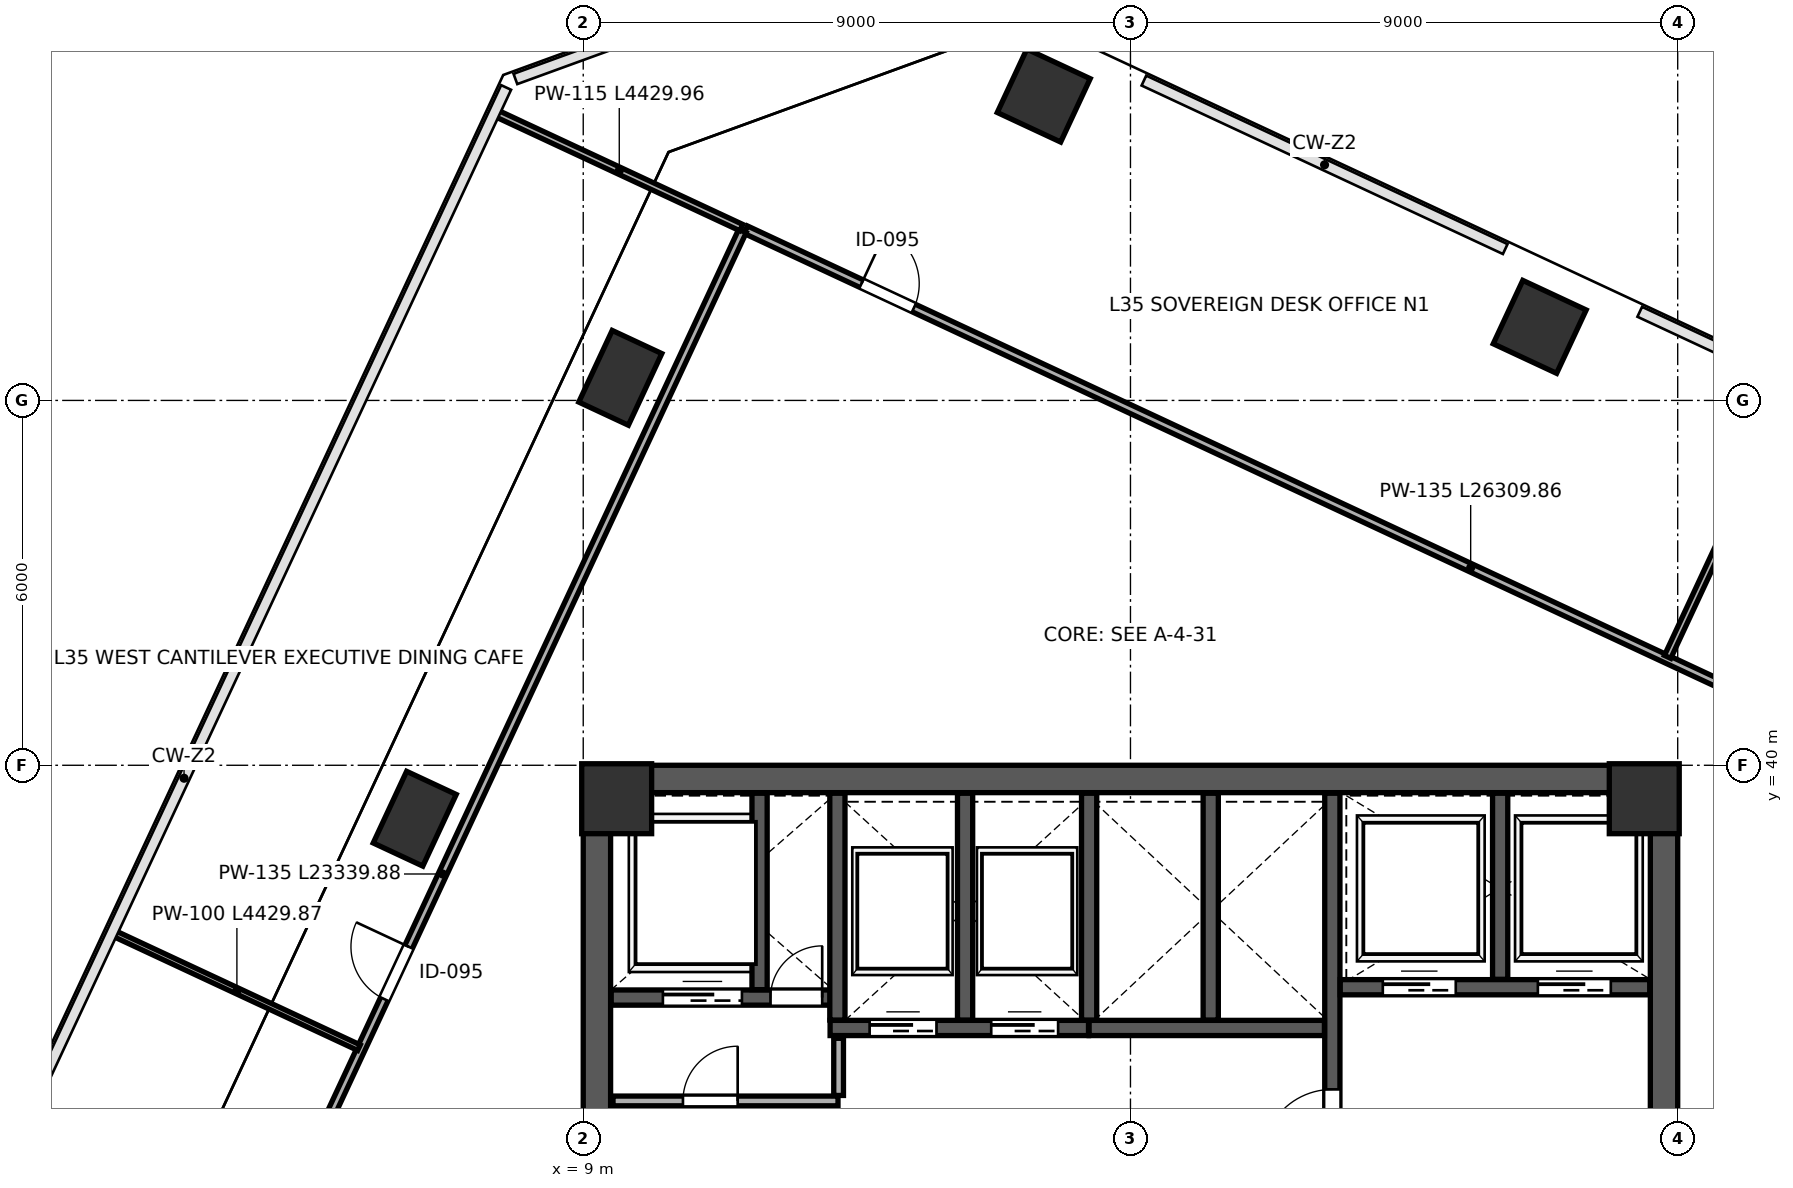
"""IFC4 building model, lengths in metres.
Left out: names, types, materials, properties, quantities, classifications, styles, units other than length and angle.
Written with IfcOpenShell. Run it as: python <this file> out.ifc"""

import sys

from ifc_helpers import new_model, si_unit, direction, frame, frame_2d, origin, origin_2d, place, context, subcontext, project, spatial, rectangle, extrude, clip, halfspace, source, transform, mapped, element, fill, save


model = new_model("IFC4")
c1 = context("Model", 3, precision=1e-05, world=origin(), true_north=direction((0.0, 1.0)))
c2 = subcontext(c1, "Body", "Model", "MODEL_VIEW")
j1 = project(units=[si_unit("LENGTHUNIT", "METRE"), si_unit("PLANEANGLEUNIT", "RADIAN")], contexts=[c1])
p1 = place(None, origin())
s1 = spatial("IfcSite", under=j1, at=p1, CompositionType="ELEMENT")
p2 = place(p1, origin())
s2 = spatial("IfcBuilding", under=s1, at=p2, CompositionType="ELEMENT")
p3 = place(p2, frame((0.0, 0.0, 158.2)))
s3 = spatial("IfcBuildingStorey", under=s2, at=p3, CompositionType="ELEMENT", Elevation=158.2)
m1 = source(origin(), c2, "Body", "SweptSolid", [
    extrude(rectangle(XDim=1.15, YDim=1.15, at=origin_2d()), origin(), (0.0, 0.0, 1.0), 4.198),
])
for number, where, z_axis, x_axis in (
    (1, (9.55, 39.45, 0.001), (0.0, 0.0, 1.0), (1.0, 0.0, 0.0)),
    (2, (26.45, 39.45, 0.001), (0.0, 0.0, 1.0), (1.0, 0.0, 0.0)),
):
    element("IfcColumn", number, at=place(p3, frame(where, z_axis=z_axis, x_axis=x_axis)), inside=s3, PredefinedType="COLUMN", context=c2, shape_type="MappedRepresentation", body=[
        mapped(m1, transform((0.0, 0.0, 0.0), scale=1.0)),
    ])
p4 = place(p3, frame((16.574, 51.013, 0.0), z_axis=(0.098540759891, 0.024403873635, 0.994833739673), x_axis=(-0.190238417306, -0.980800009902, 0.04290320684)))
e3 = element("IfcColumn", 3, at=p4, inside=s3, PredefinedType="COLUMN", context=c2, shape_type="Clipping", body=[
    clip(clip(extrude(rectangle(XDim=1.15, YDim=1.15, at=origin_2d()), origin(), (0.0, 0.0, 1.0), 4.222), halfspace(frame((0.0, 0.0, 0.079), z_axis=(0.0, 0.0, -1.0), x_axis=(1.0, 0.0, 0.0)), False)), halfspace(frame((0.0, 0.0, 4.143), z_axis=(0.0, 0.0, 1.0), x_axis=(1.0, 0.0, 0.0)), False)),
])
p5 = place(p3, frame((24.731, 47.21, 0.0), z_axis=(0.078509951606, -0.017614040803, 0.996757710312), x_axis=(-0.609432467113, -0.792108426647, 0.034004535909)))
e4 = element("IfcColumn", 4, at=p5, inside=s3, PredefinedType="COLUMN", context=c2, shape_type="Clipping", body=[
    clip(clip(extrude(rectangle(XDim=1.15, YDim=1.15, at=origin_2d()), origin(), (0.0, 0.0, 1.0), 4.214), halfspace(frame((0.0, 0.0, 0.062), z_axis=(0.0, 0.0, -1.0), x_axis=(1.0, 0.0, 0.0)), False)), halfspace(frame((0.0, 0.0, 4.151), z_axis=(0.0, 0.0, 1.0), x_axis=(1.0, 0.0, 0.0)), False)),
])
p6 = place(p3, frame((6.229, 39.121, 0.0), z_axis=(0.037698062692, 0.078638969486, 0.996190126706), x_axis=(0.635262052189, -0.771416737954, 0.036855684135)))
e5 = element("IfcColumn", 5, at=p6, inside=s3, PredefinedType="PILASTER", context=c2, shape_type="Clipping", body=[
    clip(clip(extrude(rectangle(XDim=0.9, YDim=1.3, at=origin_2d()), origin(), (0.0, 0.0, 1.0), 4.216), halfspace(frame((0.0, 0.0, 0.069), z_axis=(0.0, 0.0, -1.0), x_axis=(1.0, 0.0, 0.0)), False)), halfspace(frame((0.0, 0.0, 4.147), z_axis=(0.0, 0.0, 1.0), x_axis=(1.0, 0.0, 0.0)), False)),
])
p7 = place(p3, frame((9.61, 46.372, 0.0), z_axis=(0.074984591615, 0.060635688281, 0.995339451809), x_axis=(0.242783747421, -0.969223981277, 0.040754461182)))
e6 = element("IfcColumn", 6, at=p7, inside=s3, PredefinedType="PILASTER", context=c2, shape_type="Clipping", body=[
    clip(clip(extrude(rectangle(XDim=0.9, YDim=1.3, at=origin_2d()), origin(), (0.0, 0.0, 1.0), 4.22), halfspace(frame((0.0, 0.0, 0.076), z_axis=(0.0, 0.0, -1.0), x_axis=(1.0, 0.0, 0.0)), False)), halfspace(frame((0.0, 0.0, 4.144), z_axis=(0.0, 0.0, 1.0), x_axis=(1.0, 0.0, 0.0)), False)),
])
p8 = place(p3, frame((9.225, 24.45, 0.0), z_axis=(0.0, 0.0, 1.0), x_axis=(0.0, 1.0, 0.0)))
e7 = element("IfcWall", 7, at=p8, inside=s3, PredefinedType="SHEAR", context=c2, shape_type="SweptSolid", body=[
    extrude(rectangle(XDim=15.1, YDim=0.45, at=frame_2d((7.55, 0.0))), origin(), (0.0, 0.0, 1.0), 3.96),
])
p9 = place(p3, frame((26.775, 24.45, 0.0), z_axis=(0.0, 0.0, 1.0), x_axis=(0.0, 1.0, 0.0)))
e8 = element("IfcWall", 8, at=p9, inside=s3, PredefinedType="SHEAR", context=c2, shape_type="SweptSolid", body=[
    extrude(rectangle(XDim=15.1, YDim=0.45, at=frame_2d((7.55, 0.0))), origin(), (0.0, 0.0, 1.0), 3.96),
])
p10 = place(p9, frame((8.6, 0.0, 0.0)))
e9 = element("IfcOpeningElement", 9, at=p10, cuts=e8, PredefinedType="OPENING", context=c2, shape_type="SweptSolid", body=[
    extrude(rectangle(XDim=1.15, YDim=2.2, at=frame_2d((0.575, 1.1))), frame((0.0, 0.235, 0.0), z_axis=(0.0, -1.0, 0.0), x_axis=(1.0, 0.0, 0.0)), (0.0, 0.0, 1.0), 0.47),
])
p11 = place(p3, frame((9.0, 39.775, 0.0), z_axis=(0.0, 0.0, 1.0), x_axis=(1.0, 0.0, 0.0)))
e10 = element("IfcWall", 10, at=p11, inside=s3, PredefinedType="SHEAR", context=c2, shape_type="SweptSolid", body=[
    extrude(rectangle(XDim=18.0, YDim=0.45, at=frame_2d((9.0, 0.0))), origin(), (0.0, 0.0, 1.0), 3.96),
])
p12 = place(p3, frame((21.32, 32.12, 0.0), z_axis=(0.0, 0.0, 1.0), x_axis=(0.0, 1.0, 0.0)))
e11 = element("IfcWall", 11, at=p12, inside=s3, PredefinedType="SHEAR", context=c2, shape_type="SweptSolid", body=[
    extrude(rectangle(XDim=7.42, YDim=0.25, at=frame_2d((3.71, 0.0))), origin(), (0.0, 0.0, 1.0), 3.96),
])
p13 = place(p12, frame((1.4, 0.0, 0.0)))
e12 = element("IfcOpeningElement", 12, at=p13, cuts=e11, PredefinedType="OPENING", context=c2, shape_type="SweptSolid", body=[
    extrude(rectangle(XDim=1.15, YDim=2.2, at=frame_2d((0.575, 1.1))), frame((0.0, 0.135, 0.0), z_axis=(0.0, -1.0, 0.0), x_axis=(1.0, 0.0, 0.0)), (0.0, 0.0, 1.0), 0.27),
])
p14 = place(p3, frame((9.46, 36.18, 0.0), z_axis=(0.0, 0.0, 1.0), x_axis=(1.0, 0.0, 0.0)))
e13 = element("IfcWall", 13, at=p14, inside=s3, PredefinedType="SHEAR", context=c2, shape_type="SweptSolid", body=[
    extrude(rectangle(XDim=3.79, YDim=0.25, at=frame_2d((1.895, 0.0))), origin(), (0.0, 0.0, 1.0), 3.96),
])
p15 = place(p14, frame((2.62, 0.0, 0.0)))
e14 = element("IfcOpeningElement", 14, at=p15, cuts=e13, PredefinedType="OPENING", context=c2, shape_type="SweptSolid", body=[
    extrude(rectangle(XDim=0.85, YDim=2.1, at=frame_2d((0.425, 1.05))), frame((0.0, 0.135, 0.0), z_axis=(0.0, -1.0, 0.0), x_axis=(1.0, 0.0, 0.0)), (0.0, 0.0, 1.0), 0.27),
])
p16 = place(p14, frame((0.85, 0.0, 0.0)))
e15 = element("IfcOpeningElement", 15, at=p16, cuts=e13, PredefinedType="OPENING", context=c2, shape_type="SweptSolid", body=[
    extrude(rectangle(XDim=1.3, YDim=2.25, at=frame_2d((0.65, 1.125))), frame((0.0, 0.135, 0.0), z_axis=(0.0, -1.0, 0.0), x_axis=(1.0, 0.0, 0.0)), (0.0, 0.0, 1.0), 0.27),
])
p17 = place(p3, frame((11.9, 36.31, 0.0), z_axis=(0.0, 0.0, 1.0), x_axis=(0.0, 1.0, 0.0)))
e16 = element("IfcWall", 16, at=p17, inside=s3, PredefinedType="SHEAR", context=c2, shape_type="SweptSolid", body=[
    extrude(rectangle(XDim=3.23, YDim=0.25, at=frame_2d((1.615, 0.0))), origin(), (0.0, 0.0, 1.0), 3.96),
])
p18 = place(p3, frame((21.45, 36.35, 0.0), z_axis=(0.0, 0.0, 1.0), x_axis=(1.0, 0.0, 0.0)))
e17 = element("IfcWall", 17, at=p18, inside=s3, PredefinedType="SHEAR", context=c2, shape_type="SweptSolid", body=[
    extrude(rectangle(XDim=5.09, YDim=0.25, at=frame_2d((2.545, 0.0))), origin(), (0.0, 0.0, 1.0), 3.96),
])
p19 = place(p18, frame((0.7, 0.0, 0.0)))
e18 = element("IfcOpeningElement", 18, at=p19, cuts=e17, PredefinedType="OPENING", context=c2, shape_type="SweptSolid", body=[
    extrude(rectangle(XDim=1.2, YDim=2.2, at=frame_2d((0.6, 1.1))), frame((0.0, 0.135, 0.0), z_axis=(0.0, -1.0, 0.0), x_axis=(1.0, 0.0, 0.0)), (0.0, 0.0, 1.0), 0.27),
])
p20 = place(p18, frame((3.25, 0.0, 0.0)))
e19 = element("IfcOpeningElement", 19, at=p20, cuts=e17, PredefinedType="OPENING", context=c2, shape_type="SweptSolid", body=[
    extrude(rectangle(XDim=1.2, YDim=2.2, at=frame_2d((0.6, 1.1))), frame((0.0, 0.135, 0.0), z_axis=(0.0, -1.0, 0.0), x_axis=(1.0, 0.0, 0.0)), (0.0, 0.0, 1.0), 0.27),
])
p21 = place(p3, frame((24.08, 36.48, 0.0), z_axis=(0.0, 0.0, 1.0), x_axis=(0.0, 1.0, 0.0)))
e20 = element("IfcWall", 20, at=p21, inside=s3, PredefinedType="SHEAR", context=c2, shape_type="SweptSolid", body=[
    extrude(rectangle(XDim=3.06, YDim=0.25, at=frame_2d((1.53, 0.0))), origin(), (0.0, 0.0, 1.0), 3.96),
])
p22 = place(p3, frame((13.06, 35.68, 0.0), z_axis=(0.0, 0.0, 1.0), x_axis=(1.0, 0.0, 0.0)))
e21 = element("IfcWall", 21, at=p22, inside=s3, PredefinedType="SHEAR", context=c2, shape_type="SweptSolid", body=[
    extrude(rectangle(XDim=4.25, YDim=0.25, at=frame_2d((2.125, 0.0))), origin(), (0.0, 0.0, 1.0), 3.96),
])
p23 = place(p22, frame((0.65, 0.0, 0.0)))
e22 = element("IfcOpeningElement", 22, at=p23, cuts=e21, PredefinedType="OPENING", context=c2, shape_type="SweptSolid", body=[
    extrude(rectangle(XDim=1.1, YDim=2.2, at=frame_2d((0.55, 1.1))), frame((0.0, 0.135, 0.0), z_axis=(0.0, -1.0, 0.0), x_axis=(1.0, 0.0, 0.0)), (0.0, 0.0, 1.0), 0.27),
])
p24 = place(p22, frame((2.65, 0.0, 0.0)))
e23 = element("IfcOpeningElement", 23, at=p24, cuts=e21, PredefinedType="OPENING", context=c2, shape_type="SweptSolid", body=[
    extrude(rectangle(XDim=1.1, YDim=2.2, at=frame_2d((0.55, 1.1))), frame((0.0, 0.135, 0.0), z_axis=(0.0, -1.0, 0.0), x_axis=(1.0, 0.0, 0.0)), (0.0, 0.0, 1.0), 0.27),
])
for number, where, z_axis, x_axis in (
    (24, (13.18, 35.81, 0.0), (0.0, 0.0, 1.0), (0.0, 1.0, 0.0)),
    (25, (15.28, 35.81, 0.0), (0.0, 0.0, 1.0), (0.0, 1.0, 0.0)),
):
    element("IfcWall", number, at=place(p3, frame(where, z_axis=z_axis, x_axis=x_axis)), inside=s3, PredefinedType="SHEAR", context=c2, shape_type="SweptSolid", body=[
        extrude(rectangle(XDim=3.73, YDim=0.25, at=frame_2d((1.865, 0.0))), origin(), (0.0, 0.0, 1.0), 3.96),
    ])
p25 = place(p3, frame((17.32, 35.68, 0.0), z_axis=(0.0, 0.0, 1.0), x_axis=(1.0, 0.0, 0.0)))
e26 = element("IfcWall", 26, at=p25, inside=s3, PredefinedType="SHEAR", context=c2, shape_type="SweptSolid", body=[
    extrude(rectangle(XDim=3.87, YDim=0.25, at=frame_2d((1.935, 0.0))), origin(), (0.0, 0.0, 1.0), 3.96),
])
for number, where, z_axis, x_axis in (
    (27, (17.32, 35.81, 0.0), (0.0, 0.0, 1.0), (0.0, 1.0, 0.0)),
    (28, (19.32, 35.81, 0.0), (0.0, 0.0, 1.0), (0.0, 1.0, 0.0)),
):
    element("IfcWall", number, at=place(p3, frame(where, z_axis=z_axis, x_axis=x_axis)), inside=s3, PredefinedType="SHEAR", context=c2, shape_type="SweptSolid", body=[
        extrude(rectangle(XDim=3.73, YDim=0.25, at=frame_2d((1.865, 0.0))), origin(), (0.0, 0.0, 1.0), 3.96),
    ])
p26 = place(p3, frame((9.49, 34.48, 0.0), z_axis=(0.0, 0.0, 1.0), x_axis=(1.0, 0.0, 0.0)))
e29 = element("IfcWall", 29, at=p26, inside=s3, PredefinedType="PARTITIONING", context=c2, shape_type="SweptSolid", body=[
    extrude(rectangle(XDim=3.7, YDim=0.16, at=frame_2d((1.85, 0.0))), origin(), (0.0, 0.0, 1.0), 3.96),
])
p27 = place(p26, frame((1.15, 0.0, 0.0)))
e30 = element("IfcOpeningElement", 30, at=p27, cuts=e29, PredefinedType="OPENING", context=c2, shape_type="SweptSolid", body=[
    extrude(rectangle(XDim=0.9, YDim=2.15, at=frame_2d((0.45, 1.075))), frame((0.0, 0.09, 0.0), z_axis=(0.0, -1.0, 0.0), x_axis=(1.0, 0.0, 0.0)), (0.0, 0.0, 1.0), 0.18),
])
p28 = place(p3, frame((13.2, 34.57, 0.0), z_axis=(0.0, 0.0, 1.0), x_axis=(0.0, 1.0, 0.0)))
e31 = element("IfcWall", 31, at=p28, inside=s3, PredefinedType="PARTITIONING", context=c2, shape_type="SweptSolid", body=[
    extrude(rectangle(XDim=0.94, YDim=0.16, at=frame_2d((0.47, 0.0))), origin(), (0.0, 0.0, 1.0), 3.96),
])
p29 = place(p3, frame((11.673, 48.808, 0.0), z_axis=(0.0, 0.0, 1.0), x_axis=(0.906307085664, -0.422619765836, 0.0)))
e32 = element("IfcWall", 32, at=p29, inside=s3, PredefinedType="PARTITIONING", context=c2, shape_type="SweptSolid", body=[
    extrude(rectangle(XDim=26.31, YDim=0.135, at=frame_2d((13.155, 0.0))), origin(), (0.0, 0.0, 1.0), 3.96),
])
p30 = place(p29, frame((2.1, 0.0, 0.0)))
e33 = element("IfcOpeningElement", 33, at=p30, cuts=e32, PredefinedType="OPENING", context=c2, shape_type="SweptSolid", body=[
    extrude(rectangle(XDim=0.95, YDim=2.15, at=frame_2d((0.475, 1.075))), frame((0.0, 0.078, 0.0), z_axis=(0.0, -1.0, 0.0), x_axis=(1.0, 0.0, 0.0)), (0.0, 0.0, 1.0), 0.155),
])
p31 = place(p29, frame((18.2, 0.0, 0.0)))
e34 = element("IfcOpeningElement", 34, at=p31, cuts=e32, PredefinedType="OPENING", context=c2, shape_type="SweptSolid", body=[
    extrude(rectangle(XDim=0.95, YDim=2.15, at=frame_2d((0.475, 1.075))), frame((0.0, 0.078, 0.0), z_axis=(0.0, -1.0, 0.0), x_axis=(1.0, 0.0, 0.0)), (0.0, 0.0, 1.0), 0.155),
])
p32 = place(p3, frame((26.834, 41.782, 0.0), z_axis=(0.0, 0.0, 1.0), x_axis=(0.422631768009, 0.906301488838, 0.0)))
e35 = element("IfcWall", 35, at=p32, inside=s3, PredefinedType="PARTITIONING", context=c2, shape_type="SweptSolid", body=[
    extrude(rectangle(XDim=4.9, YDim=0.115, at=frame_2d((2.45, 0.0))), origin(), (0.0, 0.0, 1.0), 3.195),
])
p33 = place(p3, frame((1.756, 27.635, 0.0), z_axis=(0.0, 0.0, 1.0), x_axis=(0.422615732035, 0.906308966653, 0.0)))
e36 = element("IfcWall", 36, at=p33, inside=s3, PredefinedType="PARTITIONING", context=c2, shape_type="SweptSolid", body=[
    extrude(rectangle(XDim=23.34, YDim=0.135, at=frame_2d((11.67, 0.0))), origin(), (0.0, 0.0, 1.0), 3.96),
])
p34 = place(p33, frame((1.3, 0.0, 0.0)))
e37 = element("IfcOpeningElement", 37, at=p34, cuts=e36, PredefinedType="OPENING", context=c2, shape_type="SweptSolid", body=[
    extrude(rectangle(XDim=0.95, YDim=2.15, at=frame_2d((0.475, 1.075))), frame((0.0, 0.078, 0.0), z_axis=(0.0, -1.0, 0.0), x_axis=(1.0, 0.0, 0.0)), (0.0, 0.0, 1.0), 0.155),
])
p35 = place(p33, frame((9.4, 0.0, 0.0)))
e38 = element("IfcOpeningElement", 38, at=p35, cuts=e36, PredefinedType="OPENING", context=c2, shape_type="SweptSolid", body=[
    extrude(rectangle(XDim=0.95, YDim=2.15, at=frame_2d((0.475, 1.075))), frame((0.0, 0.078, 0.0), z_axis=(0.0, -1.0, 0.0), x_axis=(1.0, 0.0, 0.0)), (0.0, 0.0, 1.0), 0.155),
])
p36 = place(p3, frame((7.585, 50.714, 0.0), z_axis=(0.0, 0.0, 1.0), x_axis=(0.906295742894, -0.422644089526, 0.0)))
e39 = element("IfcWall", 39, at=p36, inside=s3, PredefinedType="PARTITIONING", context=c2, shape_type="SweptSolid", body=[
    extrude(rectangle(XDim=4.43, YDim=0.115, at=frame_2d((2.215, 0.0))), origin(), (0.0, 0.0, 1.0), 3.96),
])
p37 = place(p3, frame((1.297, 37.228, 0.0), z_axis=(0.0, 0.0, 1.0), x_axis=(0.906295742894, -0.422644089526, 0.0)))
e40 = element("IfcWall", 40, at=p37, inside=s3, PredefinedType="PARTITIONING", context=c2, shape_type="SweptSolid", body=[
    extrude(rectangle(XDim=4.43, YDim=0.1, at=frame_2d((2.215, 0.0))), origin(), (0.0, 0.0, 1.0), 3.195),
])
m2 = source(origin(), c2, "Body", "SweptSolid", [
    extrude(rectangle(XDim=1.15, YDim=2.2, at=frame_2d((0.575, 1.1))), frame((0.0, 0.025, 0.0), z_axis=(0.0, -1.0, 0.0), x_axis=(1.0, 0.0, 0.0)), (0.0, 0.0, 1.0), 0.05),
])
p38 = place(p13, origin())
e41 = element("IfcDoor", 41, at=p38, inside=s3, OperationType="SINGLE_SWING_LEFT", PredefinedType="DOOR", context=c2, shape_type="MappedRepresentation", body=[
    mapped(m2, transform((0.0, 0.0, 0.0), scale=1.0)),
])
fill(e12, e41)
m3 = source(origin(), c2, "Body", "SweptSolid", [
    extrude(rectangle(XDim=0.85, YDim=2.1, at=frame_2d((0.425, 1.05))), frame((0.0, 0.025, 0.0), z_axis=(0.0, -1.0, 0.0), x_axis=(1.0, 0.0, 0.0)), (0.0, 0.0, 1.0), 0.05),
])
p39 = place(p15, origin())
e42 = element("IfcDoor", 42, at=p39, inside=s3, OperationType="SINGLE_SWING_RIGHT", PredefinedType="DOOR", context=c2, shape_type="MappedRepresentation", body=[
    mapped(m3, transform((0.0, 0.0, 0.0), scale=1.0)),
])
fill(e14, e42)
m4 = source(origin(), c2, "Body", "SweptSolid", [
    extrude(rectangle(XDim=1.1, YDim=2.2, at=frame_2d((0.55, 1.1))), frame((0.0, 0.025, 0.0), z_axis=(0.0, -1.0, 0.0), x_axis=(1.0, 0.0, 0.0)), (0.0, 0.0, 1.0), 0.05),
])
p40 = place(p23, origin())
e43 = element("IfcDoor", 43, at=p40, inside=s3, OperationType="SLIDING_TO_LEFT", PredefinedType="DOOR", context=c2, shape_type="MappedRepresentation", body=[
    mapped(m4, transform((0.0, 0.0, 0.0), scale=1.0)),
])
fill(e22, e43)
p41 = place(p24, origin())
e44 = element("IfcDoor", 44, at=p41, inside=s3, OperationType="SLIDING_TO_RIGHT", PredefinedType="DOOR", context=c2, shape_type="MappedRepresentation", body=[
    mapped(m4, transform((0.0, 0.0, 0.0), scale=1.0)),
])
fill(e23, e44)
m5 = source(origin(), c2, "Body", "SweptSolid", [
    extrude(rectangle(XDim=1.2, YDim=2.2, at=frame_2d((0.6, 1.1))), frame((0.0, 0.025, 0.0), z_axis=(0.0, -1.0, 0.0), x_axis=(1.0, 0.0, 0.0)), (0.0, 0.0, 1.0), 0.05),
])
p42 = place(p19, origin())
e45 = element("IfcDoor", 45, at=p42, inside=s3, OperationType="SLIDING_TO_LEFT", PredefinedType="DOOR", context=c2, shape_type="MappedRepresentation", body=[
    mapped(m5, transform((0.0, 0.0, 0.0), scale=1.0)),
])
fill(e18, e45)
p43 = place(p20, origin())
e46 = element("IfcDoor", 46, at=p43, inside=s3, OperationType="SLIDING_TO_RIGHT", PredefinedType="DOOR", context=c2, shape_type="MappedRepresentation", body=[
    mapped(m5, transform((0.0, 0.0, 0.0), scale=1.0)),
])
fill(e19, e46)
m6 = source(origin(), c2, "Body", "SweptSolid", [
    extrude(rectangle(XDim=1.3, YDim=2.25, at=frame_2d((0.65, 1.125))), frame((0.0, 0.025, 0.0), z_axis=(0.0, -1.0, 0.0), x_axis=(1.0, 0.0, 0.0)), (0.0, 0.0, 1.0), 0.05),
])
p44 = place(p16, origin())
e47 = element("IfcDoor", 47, at=p44, inside=s3, OperationType="SLIDING_TO_LEFT", PredefinedType="DOOR", context=c2, shape_type="MappedRepresentation", body=[
    mapped(m6, transform((0.0, 0.0, 0.0), scale=1.0)),
])
fill(e15, e47)
m7 = source(origin(), c2, "Body", "SweptSolid", [
    extrude(rectangle(XDim=0.9, YDim=2.15, at=frame_2d((0.45, 1.075))), frame((0.0, 0.025, 0.0), z_axis=(0.0, -1.0, 0.0), x_axis=(1.0, 0.0, 0.0)), (0.0, 0.0, 1.0), 0.05),
])
p45 = place(p27, origin())
e48 = element("IfcDoor", 48, at=p45, inside=s3, OperationType="SINGLE_SWING_RIGHT", PredefinedType="DOOR", context=c2, shape_type="MappedRepresentation", body=[
    mapped(m7, transform((0.0, 0.0, 0.0), scale=1.0)),
])
fill(e30, e48)
m8 = source(origin(), c2, "Body", "SweptSolid", [
    extrude(rectangle(XDim=0.95, YDim=2.15, at=frame_2d((0.475, 1.075))), frame((0.0, 0.025, 0.0), z_axis=(0.0, -1.0, 0.0), x_axis=(1.0, 0.0, 0.0)), (0.0, 0.0, 1.0), 0.05),
])
p46 = place(p30, origin())
e49 = element("IfcDoor", 49, at=p46, inside=s3, OperationType="SINGLE_SWING_LEFT", PredefinedType="DOOR", context=c2, shape_type="MappedRepresentation", body=[
    mapped(m8, transform((0.0, 0.0, 0.0), scale=1.0)),
])
fill(e33, e49)
p47 = place(p35, origin())
e50 = element("IfcDoor", 50, at=p47, inside=s3, OperationType="SINGLE_SWING_RIGHT", PredefinedType="DOOR", context=c2, shape_type="MappedRepresentation", body=[
    mapped(m8, transform((0.0, 0.0, 0.0), scale=1.0)),
])
fill(e38, e50)
save(model, sys.argv[1])
